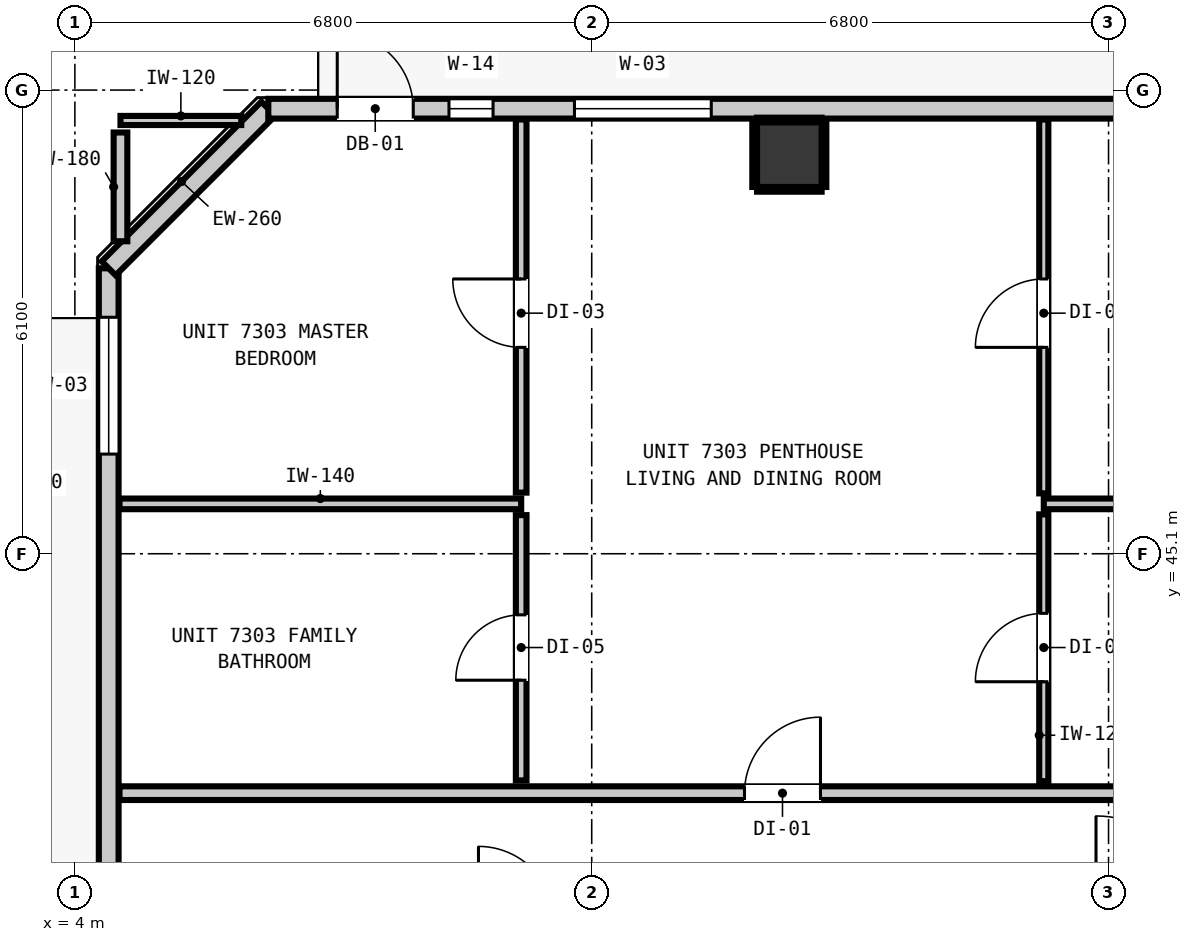
"""IFC4 building model, lengths in metres.
Left out: names, types, materials, properties, quantities, classifications, styles, units other than length and angle.
Written with IfcOpenShell. Run it as: python <this file> out.ifc"""

import sys

from ifc_helpers import new_model, si_unit, direction, frame, frame_2d, origin, origin_2d, place, context, subcontext, project, spatial, rectangle, extrude, element, fill, save


model = new_model("IFC4")
c1 = context("Model", 3, precision=1e-05, world=origin(), true_north=direction((0.0, 1.0)))
c2 = subcontext(c1, "Body", "Model", "MODEL_VIEW")
j1 = project(units=[si_unit("LENGTHUNIT", "METRE"), si_unit("PLANEANGLEUNIT", "RADIAN")], contexts=[c1])
p1 = place(None, origin())
s1 = spatial("IfcSite", under=j1, at=p1, CompositionType="ELEMENT")
p2 = place(p1, origin())
s2 = spatial("IfcBuilding", under=s1, at=p2, CompositionType="ELEMENT")
p3 = place(p2, frame((0.0, 0.0, 251.2)))
s3 = spatial("IfcBuildingStorey", under=s2, at=p3, CompositionType="ELEMENT", Elevation=251.2)
p4 = place(p3, frame((13.4, 50.35, -0.2), z_axis=(0.0, 0.0, 1.0), x_axis=(1.0, 0.0, 0.0)))
e1 = element("IfcColumn", 1, at=p4, inside=s3, PredefinedType="COLUMN", context=c2, shape_type="SweptSolid", body=[
    extrude(rectangle(XDim=0.85, YDim=0.85, at=origin_2d()), origin(), (0.0, 0.0, 1.0), 3.52),
])
p5 = place(p3, frame((4.445, 18.545, 0.0), z_axis=(0.0, 0.0, 1.0), x_axis=(0.0, 1.0, 0.0)))
e2 = element("IfcWall", 2, at=p5, inside=s3, PredefinedType="STANDARD", context=c2, shape_type="SweptSolid", body=[
    extrude(rectangle(XDim=30.31, YDim=0.26, at=frame_2d((15.155, 0.0))), origin(), (0.0, 0.0, 1.0), 3.1),
])
p6 = place(p5, frame((4.434, 0.0, 0.0)))
e3 = element("IfcOpeningElement", 3, at=p6, cuts=e2, PredefinedType="OPENING", context=c2, shape_type="SweptSolid", body=[
    extrude(rectangle(XDim=1.0, YDim=2.15, at=frame_2d((0.5, 1.075))), frame((0.0, 0.14, 0.0), z_axis=(0.0, -1.0, 0.0), x_axis=(1.0, 0.0, 0.0)), (0.0, 0.0, 1.0), 0.28),
])
p7 = place(p5, frame((27.866, 0.0, 0.85)))
e4 = element("IfcOpeningElement", 4, at=p7, cuts=e2, PredefinedType="OPENING", context=c2, shape_type="SweptSolid", body=[
    extrude(rectangle(XDim=1.8, YDim=1.9, at=frame_2d((0.9, 0.95))), frame((0.0, 0.14, 0.0), z_axis=(0.0, -1.0, 0.0), x_axis=(1.0, 0.0, 0.0)), (0.0, 0.0, 1.0), 0.28),
])
p8 = place(p3, frame((4.445, 48.855, 0.0), z_axis=(0.0, 0.0, 1.0), x_axis=(0.707065676302, 0.707147883682, 0.0)))
e5 = element("IfcWall", 5, at=p8, inside=s3, PredefinedType="STANDARD", context=c2, shape_type="SweptSolid", body=[
    extrude(rectangle(XDim=2.97, YDim=0.26, at=frame_2d((1.485, 0.0))), origin(), (0.0, 0.0, 1.0), 3.1),
])
p9 = place(p3, frame((6.545, 50.955, 0.0), z_axis=(0.0, 0.0, 1.0), x_axis=(1.0, 0.0, 0.0)))
e6 = element("IfcWall", 6, at=p9, inside=s3, PredefinedType="STANDARD", context=c2, shape_type="SweptSolid", body=[
    extrude(rectangle(XDim=32.71, YDim=0.26, at=frame_2d((16.355, 0.0))), origin(), (0.0, 0.0, 1.0), 3.1),
])
p10 = place(p9, frame((0.907, 0.0, 0.0)))
e7 = element("IfcOpeningElement", 7, at=p10, cuts=e6, PredefinedType="OPENING", context=c2, shape_type="SweptSolid", body=[
    extrude(rectangle(XDim=1.0, YDim=2.15, at=frame_2d((0.5, 1.075))), frame((0.0, 0.14, 0.0), z_axis=(0.0, -1.0, 0.0), x_axis=(1.0, 0.0, 0.0)), (0.0, 0.0, 1.0), 0.28),
])
p11 = place(p9, frame((4.028, 0.0, 0.85)))
e8 = element("IfcOpeningElement", 8, at=p11, cuts=e6, PredefinedType="OPENING", context=c2, shape_type="SweptSolid", body=[
    extrude(rectangle(XDim=1.8, YDim=1.9, at=frame_2d((0.9, 0.95))), frame((0.0, 0.14, 0.0), z_axis=(0.0, -1.0, 0.0), x_axis=(1.0, 0.0, 0.0)), (0.0, 0.0, 1.0), 0.28),
])
p12 = place(p9, frame((2.377, 0.0, 0.85)))
e9 = element("IfcOpeningElement", 9, at=p12, cuts=e6, PredefinedType="OPENING", context=c2, shape_type="SweptSolid", body=[
    extrude(rectangle(XDim=0.58, YDim=1.5, at=frame_2d((0.29, 0.75))), frame((0.0, 0.14, 0.0), z_axis=(0.0, -1.0, 0.0), x_axis=(1.0, 0.0, 0.0)), (0.0, 0.0, 1.0), 0.28),
])
p13 = place(p9, frame((11.166, 0.0, 0.85)))
e10 = element("IfcOpeningElement", 10, at=p13, cuts=e6, PredefinedType="OPENING", context=c2, shape_type="SweptSolid", body=[
    extrude(rectangle(XDim=1.8, YDim=1.9, at=frame_2d((0.9, 0.95))), frame((0.0, 0.14, 0.0), z_axis=(0.0, -1.0, 0.0), x_axis=(1.0, 0.0, 0.0)), (0.0, 0.0, 1.0), 0.28),
])
p14 = place(p9, frame((17.705, 0.0, 0.85)))
e11 = element("IfcOpeningElement", 11, at=p14, cuts=e6, PredefinedType="OPENING", context=c2, shape_type="SweptSolid", body=[
    extrude(rectangle(XDim=1.8, YDim=1.9, at=frame_2d((0.9, 0.95))), frame((0.0, 0.14, 0.0), z_axis=(0.0, -1.0, 0.0), x_axis=(1.0, 0.0, 0.0)), (0.0, 0.0, 1.0), 0.28),
])
p15 = place(p9, frame((25.405, 0.0, 0.85)))
e12 = element("IfcOpeningElement", 12, at=p15, cuts=e6, PredefinedType="OPENING", context=c2, shape_type="SweptSolid", body=[
    extrude(rectangle(XDim=1.8, YDim=1.9, at=frame_2d((0.9, 0.95))), frame((0.0, 0.14, 0.0), z_axis=(0.0, -1.0, 0.0), x_axis=(1.0, 0.0, 0.0)), (0.0, 0.0, 1.0), 0.28),
])
p16 = place(p3, frame((4.587, 41.95, 0.0), z_axis=(0.0, 0.0, 1.0), x_axis=(1.0, 0.0, 0.0)))
e13 = element("IfcWall", 13, at=p16, inside=s3, PredefinedType="PARTITIONING", context=c2, shape_type="SweptSolid", body=[
    extrude(rectangle(XDim=36.626, YDim=0.18, at=frame_2d((18.313, 0.0))), origin(), (0.0, 0.0, 1.0), 3.1),
])
p17 = place(p16, frame((8.223, 0.0, 0.0)))
e14 = element("IfcOpeningElement", 14, at=p17, cuts=e13, PredefinedType="OPENING", context=c2, shape_type="SweptSolid", body=[
    extrude(rectangle(XDim=1.0, YDim=2.15, at=frame_2d((0.5, 1.075))), frame((0.0, 0.1, 0.0), z_axis=(0.0, -1.0, 0.0), x_axis=(1.0, 0.0, 0.0)), (0.0, 0.0, 1.0), 0.2),
])
p18 = place(p16, frame((29.299, 0.0, 0.0)))
e15 = element("IfcOpeningElement", 15, at=p18, cuts=e13, PredefinedType="OPENING", context=c2, shape_type="SweptSolid", body=[
    extrude(rectangle(XDim=0.9, YDim=2.1, at=frame_2d((0.45, 1.05))), frame((0.0, 0.1, 0.0), z_axis=(0.0, -1.0, 0.0), x_axis=(1.0, 0.0, 0.0)), (0.0, 0.0, 1.0), 0.2),
])
p19 = place(p3, frame((4.587, 45.756, 0.0), z_axis=(0.0, 0.0, 1.0), x_axis=(1.0, 0.0, 0.0)))
e16 = element("IfcWall", 16, at=p19, inside=s3, PredefinedType="PARTITIONING", context=c2, shape_type="SweptSolid", body=[
    extrude(rectangle(XDim=5.285, YDim=0.14, at=frame_2d((2.643, 0.0))), origin(), (0.0, 0.0, 1.0), 3.1),
])
p20 = place(p3, frame((16.748, 45.756, 0.0), z_axis=(0.0, 0.0, 1.0), x_axis=(1.0, 0.0, 0.0)))
e17 = element("IfcWall", 17, at=p20, inside=s3, PredefinedType="PARTITIONING", context=c2, shape_type="SweptSolid", body=[
    extrude(rectangle(XDim=10.772, YDim=0.14, at=frame_2d((5.386, 0.0))), origin(), (0.0, 0.0, 1.0), 3.1),
])
p21 = place(p3, frame((4.6, 50.8, 0.0), z_axis=(0.0, 0.0, 1.0), x_axis=(1.0, 0.0, 0.0)))
e18 = element("IfcWall", 18, at=p21, inside=s3, PredefinedType="PARTITIONING", context=c2, shape_type="SweptSolid", body=[
    extrude(rectangle(XDim=1.589, YDim=0.12, at=frame_2d((0.794, 0.0))), origin(), (0.0, 0.0, 1.0), 3.1),
])
p22 = place(p3, frame((4.6, 49.211, 0.0), z_axis=(0.0, 0.0, 1.0), x_axis=(0.0, 1.0, 0.0)))
e19 = element("IfcWall", 19, at=p22, inside=s3, PredefinedType="PARTITIONING", context=c2, shape_type="SweptSolid", body=[
    extrude(rectangle(XDim=1.431, YDim=0.18, at=frame_2d((0.716, 0.0))), origin(), (0.0, 0.0, 1.0), 3.1),
])
p23 = place(p3, frame((9.872, 42.118, 0.0), z_axis=(0.0, 0.0, 1.0), x_axis=(0.0, 1.0, 0.0)))
e20 = element("IfcWall", 20, at=p23, inside=s3, PredefinedType="PARTITIONING", context=c2, shape_type="SweptSolid", body=[
    extrude(rectangle(XDim=3.49, YDim=0.14, at=frame_2d((1.745, 0.0))), origin(), (0.0, 0.0, 1.0), 3.1),
])
p24 = place(p23, frame((1.318, 0.0, 0.0)))
e21 = element("IfcOpeningElement", 21, at=p24, cuts=e20, PredefinedType="OPENING", context=c2, shape_type="SweptSolid", body=[
    extrude(rectangle(XDim=0.86, YDim=2.02, at=frame_2d((0.43, 1.01))), frame((0.0, 0.08, 0.0), z_axis=(0.0, -1.0, 0.0), x_axis=(1.0, 0.0, 0.0)), (0.0, 0.0, 1.0), 0.16),
])
p25 = place(p3, frame((9.872, 45.904, 0.0), z_axis=(0.0, 0.0, 1.0), x_axis=(0.0, 1.0, 0.0)))
e22 = element("IfcWall", 22, at=p25, inside=s3, PredefinedType="PARTITIONING", context=c2, shape_type="SweptSolid", body=[
    extrude(rectangle(XDim=4.909, YDim=0.14, at=frame_2d((2.455, 0.0))), origin(), (0.0, 0.0, 1.0), 3.1),
])
p26 = place(p25, frame((1.911, 0.0, 0.0)))
e23 = element("IfcOpeningElement", 23, at=p26, cuts=e22, PredefinedType="OPENING", context=c2, shape_type="SweptSolid", body=[
    extrude(rectangle(XDim=0.9, YDim=2.1, at=frame_2d((0.45, 1.05))), frame((0.0, 0.08, 0.0), z_axis=(0.0, -1.0, 0.0), x_axis=(1.0, 0.0, 0.0)), (0.0, 0.0, 1.0), 0.16),
])
p27 = place(p3, frame((16.748, 42.108, 0.0), z_axis=(0.0, 0.0, 1.0), x_axis=(0.0, 1.0, 0.0)))
e24 = element("IfcWall", 24, at=p27, inside=s3, PredefinedType="PARTITIONING", context=c2, shape_type="SweptSolid", body=[
    extrude(rectangle(XDim=3.51, YDim=0.12, at=frame_2d((1.755, 0.0))), origin(), (0.0, 0.0, 1.0), 3.1),
])
p28 = place(p27, frame((1.308, 0.0, 0.0)))
e25 = element("IfcOpeningElement", 25, at=p28, cuts=e24, PredefinedType="OPENING", context=c2, shape_type="SweptSolid", body=[
    extrude(rectangle(XDim=0.9, YDim=2.1, at=frame_2d((0.45, 1.05))), frame((0.0, 0.07, 0.0), z_axis=(0.0, -1.0, 0.0), x_axis=(1.0, 0.0, 0.0)), (0.0, 0.0, 1.0), 0.14),
])
p29 = place(p3, frame((16.748, 45.894, 0.0), z_axis=(0.0, 0.0, 1.0), x_axis=(0.0, 1.0, 0.0)))
e26 = element("IfcWall", 26, at=p29, inside=s3, PredefinedType="PARTITIONING", context=c2, shape_type="SweptSolid", body=[
    extrude(rectangle(XDim=4.919, YDim=0.12, at=frame_2d((2.459, 0.0))), origin(), (0.0, 0.0, 1.0), 3.1),
])
p30 = place(p29, frame((1.921, 0.0, 0.0)))
e27 = element("IfcOpeningElement", 27, at=p30, cuts=e26, PredefinedType="OPENING", context=c2, shape_type="SweptSolid", body=[
    extrude(rectangle(XDim=0.9, YDim=2.1, at=frame_2d((0.45, 1.05))), frame((0.0, 0.07, 0.0), z_axis=(0.0, -1.0, 0.0), x_axis=(1.0, 0.0, 0.0)), (0.0, 0.0, 1.0), 0.14),
])
for number, where, z_axis, x_axis in (
    (28, (12.975, 49.893, 0.0), (0.0, 0.0, 1.0), (1.0, 0.0, 0.0)),
    (29, (12.975, 50.807, 0.0), (0.0, 0.0, 1.0), (1.0, 0.0, 0.0)),
    (30, (12.943, 49.925, 0.0), (0.0, 0.0, 1.0), (0.0, 1.0, 0.0)),
    (31, (13.857, 49.925, 0.0), (0.0, 0.0, 1.0), (0.0, 1.0, 0.0)),
):
    element("IfcWall", number, at=place(p3, frame(where, z_axis=z_axis, x_axis=x_axis)), inside=s3, PredefinedType="PARTITIONING", context=c2, shape_type="SweptSolid", body=[
        extrude(rectangle(XDim=0.85, YDim=0.06, at=frame_2d((0.425, 0.0))), origin(), (0.0, 0.0, 1.0), 1.45),
    ])
p31 = place(p10, origin())
e32 = element("IfcDoor", 32, at=p31, inside=s3, OperationType="SINGLE_SWING_LEFT", PredefinedType="DOOR", context=c2, shape_type="SweptSolid", body=[
    extrude(rectangle(XDim=1.0, YDim=2.15, at=frame_2d((0.5, 1.075))), frame((0.0, 0.025, 0.0), z_axis=(0.0, -1.0, 0.0), x_axis=(1.0, 0.0, 0.0)), (0.0, 0.0, 1.0), 0.05),
])
fill(e7, e32)
p32 = place(p7, origin())
e33 = element("IfcWindow", 33, at=p32, inside=s3, PartitioningType="SINGLE_PANEL", PredefinedType="WINDOW", context=c2, shape_type="SweptSolid", body=[
    extrude(rectangle(XDim=1.8, YDim=1.9, at=frame_2d((0.9, 0.95))), frame((0.0, 0.03, 0.0), z_axis=(0.0, -1.0, 0.0), x_axis=(1.0, 0.0, 0.0)), (0.0, 0.0, 1.0), 0.06),
])
fill(e4, e33)
p33 = place(p11, origin())
e34 = element("IfcWindow", 34, at=p33, inside=s3, PartitioningType="SINGLE_PANEL", PredefinedType="WINDOW", context=c2, shape_type="SweptSolid", body=[
    extrude(rectangle(XDim=1.8, YDim=1.9, at=frame_2d((0.9, 0.95))), frame((0.0, 0.03, 0.0), z_axis=(0.0, -1.0, 0.0), x_axis=(1.0, 0.0, 0.0)), (0.0, 0.0, 1.0), 0.06),
])
fill(e8, e34)
p34 = place(p12, origin())
e35 = element("IfcWindow", 35, at=p34, inside=s3, PartitioningType="SINGLE_PANEL", PredefinedType="WINDOW", context=c2, shape_type="SweptSolid", body=[
    extrude(rectangle(XDim=0.58, YDim=1.5, at=frame_2d((0.29, 0.75))), frame((0.0, 0.03, 0.0), z_axis=(0.0, -1.0, 0.0), x_axis=(1.0, 0.0, 0.0)), (0.0, 0.0, 1.0), 0.06),
])
fill(e9, e35)
p35 = place(p17, origin())
e36 = element("IfcDoor", 36, at=p35, inside=s3, OperationType="SINGLE_SWING_RIGHT", PredefinedType="DOOR", context=c2, shape_type="SweptSolid", body=[
    extrude(rectangle(XDim=1.0, YDim=2.15, at=frame_2d((0.5, 1.075))), frame((0.0, 0.025, 0.0), z_axis=(0.0, -1.0, 0.0), x_axis=(1.0, 0.0, 0.0)), (0.0, 0.0, 1.0), 0.05),
])
fill(e14, e36)
p36 = place(p24, origin())
e37 = element("IfcDoor", 37, at=p36, inside=s3, OperationType="SINGLE_SWING_LEFT", PredefinedType="DOOR", context=c2, shape_type="SweptSolid", body=[
    extrude(rectangle(XDim=0.86, YDim=2.02, at=frame_2d((0.43, 1.01))), frame((0.0, 0.025, 0.0), z_axis=(0.0, -1.0, 0.0), x_axis=(1.0, 0.0, 0.0)), (0.0, 0.0, 1.0), 0.05),
])
fill(e21, e37)
p37 = place(p26, origin())
e38 = element("IfcDoor", 38, at=p37, inside=s3, OperationType="SINGLE_SWING_RIGHT", PredefinedType="DOOR", context=c2, shape_type="SweptSolid", body=[
    extrude(rectangle(XDim=0.9, YDim=2.1, at=frame_2d((0.45, 1.05))), frame((0.0, 0.025, 0.0), z_axis=(0.0, -1.0, 0.0), x_axis=(1.0, 0.0, 0.0)), (0.0, 0.0, 1.0), 0.05),
])
fill(e23, e38)
p38 = place(p28, origin())
e39 = element("IfcDoor", 39, at=p38, inside=s3, OperationType="SINGLE_SWING_LEFT", PredefinedType="DOOR", context=c2, shape_type="SweptSolid", body=[
    extrude(rectangle(XDim=0.9, YDim=2.1, at=frame_2d((0.45, 1.05))), frame((0.0, 0.025, 0.0), z_axis=(0.0, -1.0, 0.0), x_axis=(1.0, 0.0, 0.0)), (0.0, 0.0, 1.0), 0.05),
])
fill(e25, e39)
p39 = place(p30, origin())
e40 = element("IfcDoor", 40, at=p39, inside=s3, OperationType="SINGLE_SWING_LEFT", PredefinedType="DOOR", context=c2, shape_type="SweptSolid", body=[
    extrude(rectangle(XDim=0.9, YDim=2.1, at=frame_2d((0.45, 1.05))), frame((0.0, 0.025, 0.0), z_axis=(0.0, -1.0, 0.0), x_axis=(1.0, 0.0, 0.0)), (0.0, 0.0, 1.0), 0.05),
])
fill(e27, e40)
save(model, sys.argv[1])
